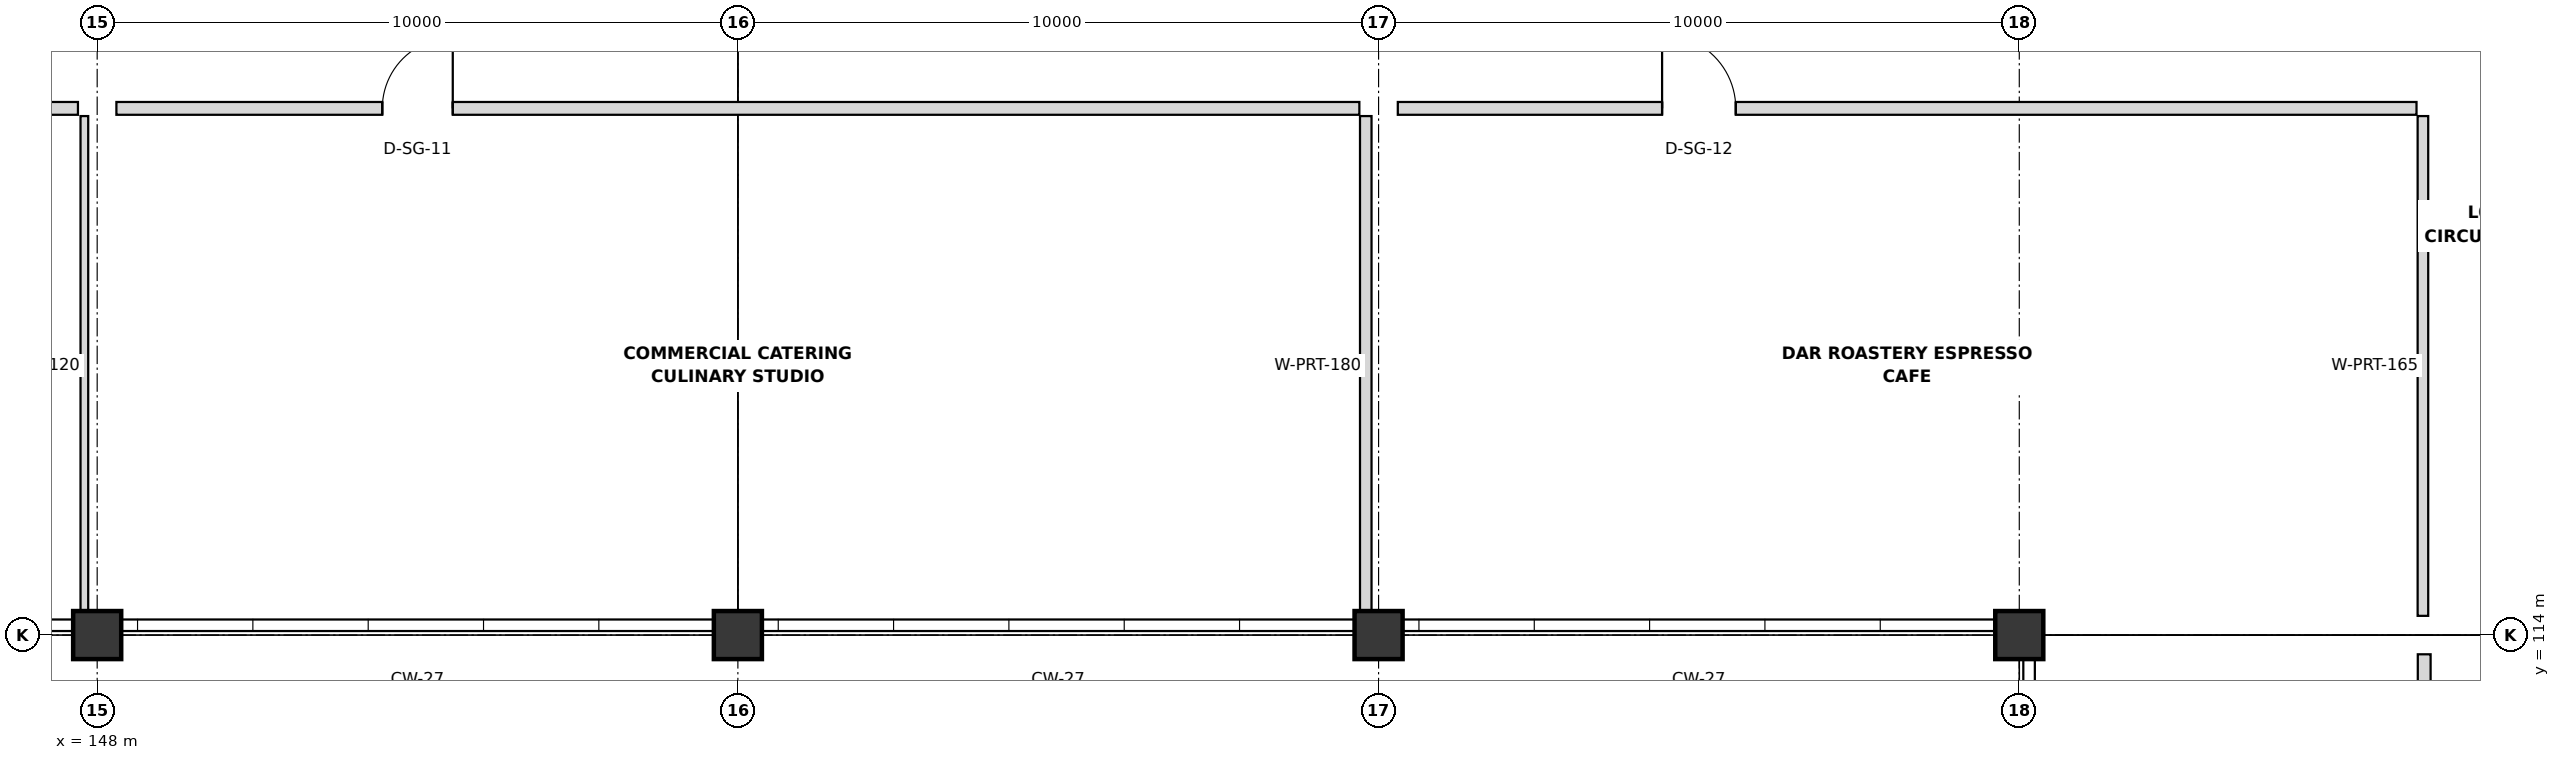
"""IFC4 building model, lengths in metres.
Left out: names, types, materials, properties, quantities, classifications, styles, units other than length and angle.
Written with IfcOpenShell. Run it as: python <this file> out.ifc"""

import sys

from ifc_helpers import new_model, si_unit, direction, frame, frame_2d, origin, origin_2d, place, context, subcontext, project, spatial, rectangle, extrude, element, fill, save


model = new_model("IFC4")
c1 = context("Model", 3, precision=1e-05, world=origin(), true_north=direction((0.0, 1.0)))
c2 = subcontext(c1, "Body", "Model", "MODEL_VIEW")
j1 = project(units=[si_unit("LENGTHUNIT", "METRE"), si_unit("PLANEANGLEUNIT", "RADIAN")], contexts=[c1])
p1 = place(None, origin())
s1 = spatial("IfcSite", under=j1, at=p1, CompositionType="ELEMENT")
p2 = place(p1, origin())
s2 = spatial("IfcBuilding", under=s1, at=p2, CompositionType="ELEMENT")
p3 = place(p2, frame((0.0, 0.0, 9.6)))
s3 = spatial("IfcBuildingStorey", under=s2, at=p3, CompositionType="ELEMENT", Elevation=9.6)
for number, where, z_axis, x_axis in (
    (1, (148.0, 114.0, 0.0), (0.0, 0.0, 1.0), (1.0, 0.0, 0.0)),
    (2, (158.0, 114.0, 0.0), (0.0, 0.0, 1.0), (1.0, 0.0, 0.0)),
    (3, (168.0, 114.0, 0.0), (0.0, 0.0, 1.0), (1.0, 0.0, 0.0)),
    (4, (178.0, 114.0, 0.0), (0.0, 0.0, 1.0), (1.0, 0.0, 0.0)),
):
    element("IfcColumn", number, at=place(p3, frame(where, z_axis=z_axis, x_axis=x_axis)), inside=s3, PredefinedType="COLUMN", context=c2, shape_type="SweptSolid", body=[
        extrude(rectangle(XDim=0.75, YDim=0.75, at=origin_2d()), origin(), (0.0, 0.0, 1.0), 4.8),
    ])
p4 = place(p3, frame((118.4, 122.22, 0.0), z_axis=(0.0, 0.0, 1.0), x_axis=(1.0, 0.0, 0.0)))
e5 = element("IfcWall", 5, at=p4, inside=s3, PredefinedType="PARTITIONING", context=c2, shape_type="SweptSolid", body=[
    extrude(rectangle(XDim=29.3, YDim=0.2, at=frame_2d((14.65, 0.0))), origin(), (0.0, 0.0, 1.0), 3.758),
])
p5 = place(p4, frame((13.55, 0.0, 0.0)))
e6 = element("IfcOpeningElement", 6, at=p5, cuts=e5, PredefinedType="OPENING", context=c2, shape_type="SweptSolid", body=[
    extrude(rectangle(XDim=2.1, YDim=2.3, at=frame_2d((1.05, 1.15))), frame((0.0, 0.11, 0.0), z_axis=(0.0, -1.0, 0.0), x_axis=(1.0, 0.0, 0.0)), (0.0, 0.0, 1.0), 0.22),
])
p6 = place(p3, frame((147.8, 114.3, 0.0), z_axis=(0.0, 0.0, 1.0), x_axis=(0.0, 1.0, 0.0)))
e7 = element("IfcWall", 7, at=p6, inside=s3, PredefinedType="PARTITIONING", context=c2, shape_type="SweptSolid", body=[
    extrude(rectangle(XDim=7.8, YDim=0.12, at=frame_2d((3.9, 0.0))), origin(), (0.0, 0.0, 1.0), 3.658),
])
p7 = place(p3, frame((148.3, 122.22, 0.0), z_axis=(0.0, 0.0, 1.0), x_axis=(1.0, 0.0, 0.0)))
e8 = element("IfcWall", 8, at=p7, inside=s3, PredefinedType="PARTITIONING", context=c2, shape_type="SweptSolid", body=[
    extrude(rectangle(XDim=19.4, YDim=0.2, at=frame_2d((9.7, 0.0))), origin(), (0.0, 0.0, 1.0), 3.758),
])
p8 = place(p7, frame((4.15, 0.0, 0.0)))
e9 = element("IfcOpeningElement", 9, at=p8, cuts=e8, PredefinedType="OPENING", context=c2, shape_type="SweptSolid", body=[
    extrude(rectangle(XDim=1.1, YDim=2.2, at=frame_2d((0.55, 1.1))), frame((0.0, 0.11, 0.0), z_axis=(0.0, -1.0, 0.0), x_axis=(1.0, 0.0, 0.0)), (0.0, 0.0, 1.0), 0.22),
])
p9 = place(p3, frame((167.8, 114.3, 0.0), z_axis=(0.0, 0.0, 1.0), x_axis=(0.0, 1.0, 0.0)))
e10 = element("IfcWall", 10, at=p9, inside=s3, PredefinedType="PARTITIONING", context=c2, shape_type="SweptSolid", body=[
    extrude(rectangle(XDim=7.8, YDim=0.18, at=frame_2d((3.9, 0.0))), origin(), (0.0, 0.0, 1.0), 3.658),
])
p10 = place(p3, frame((168.3, 122.22, 0.0), z_axis=(0.0, 0.0, 1.0), x_axis=(1.0, 0.0, 0.0)))
e11 = element("IfcWall", 11, at=p10, inside=s3, PredefinedType="PARTITIONING", context=c2, shape_type="SweptSolid", body=[
    extrude(rectangle(XDim=15.9, YDim=0.2, at=frame_2d((7.95, 0.0))), origin(), (0.0, 0.0, 1.0), 3.758),
])
p11 = place(p10, frame((4.125, 0.0, 0.0)))
e12 = element("IfcOpeningElement", 12, at=p11, cuts=e11, PredefinedType="OPENING", context=c2, shape_type="SweptSolid", body=[
    extrude(rectangle(XDim=1.15, YDim=2.2, at=frame_2d((0.575, 1.1))), frame((0.0, 0.11, 0.0), z_axis=(0.0, -1.0, 0.0), x_axis=(1.0, 0.0, 0.0)), (0.0, 0.0, 1.0), 0.22),
])
p12 = place(p3, frame((184.3, 114.3, 0.0), z_axis=(0.0, 0.0, 1.0), x_axis=(0.0, 1.0, 0.0)))
e13 = element("IfcWall", 13, at=p12, inside=s3, PredefinedType="PARTITIONING", context=c2, shape_type="SweptSolid", body=[
    extrude(rectangle(XDim=7.8, YDim=0.165, at=frame_2d((3.9, 0.0))), origin(), (0.0, 0.0, 1.0), 3.658),
])
p13 = place(p3, frame((184.32, 96.3, 0.0), z_axis=(0.0, 0.0, 1.0), x_axis=(0.0, 1.0, 0.0)))
e14 = element("IfcWall", 14, at=p13, inside=s3, PredefinedType="PARTITIONING", context=c2, shape_type="SweptSolid", body=[
    extrude(rectangle(XDim=17.4, YDim=0.2, at=frame_2d((8.7, 0.0))), origin(), (0.0, 0.0, 1.0), 3.658),
])
p14 = place(p13, frame((11.2, 0.0, 0.0)))
e15 = element("IfcOpeningElement", 15, at=p14, cuts=e14, PredefinedType="OPENING", context=c2, shape_type="SweptSolid", body=[
    extrude(rectangle(XDim=1.0, YDim=2.1, at=frame_2d((0.5, 1.05))), frame((0.0, 0.11, 0.0), z_axis=(0.0, -1.0, 0.0), x_axis=(1.0, 0.0, 0.0)), (0.0, 0.0, 1.0), 0.22),
])
p15 = place(p8, origin())
e16 = element("IfcDoor", 16, at=p15, inside=s3, OperationType="SINGLE_SWING_RIGHT", PredefinedType="DOOR", context=c2, shape_type="SweptSolid", body=[
    extrude(rectangle(XDim=1.1, YDim=2.2, at=frame_2d((0.55, 1.1))), frame((0.0, 0.025, 0.0), z_axis=(0.0, -1.0, 0.0), x_axis=(1.0, 0.0, 0.0)), (0.0, 0.0, 1.0), 0.05),
])
fill(e9, e16)
p16 = place(p11, origin())
e17 = element("IfcDoor", 17, at=p16, inside=s3, OperationType="SINGLE_SWING_LEFT", PredefinedType="DOOR", context=c2, shape_type="SweptSolid", body=[
    extrude(rectangle(XDim=1.15, YDim=2.2, at=frame_2d((0.575, 1.1))), frame((0.0, 0.025, 0.0), z_axis=(0.0, -1.0, 0.0), x_axis=(1.0, 0.0, 0.0)), (0.0, 0.0, 1.0), 0.05),
])
fill(e12, e17)
save(model, sys.argv[1])
